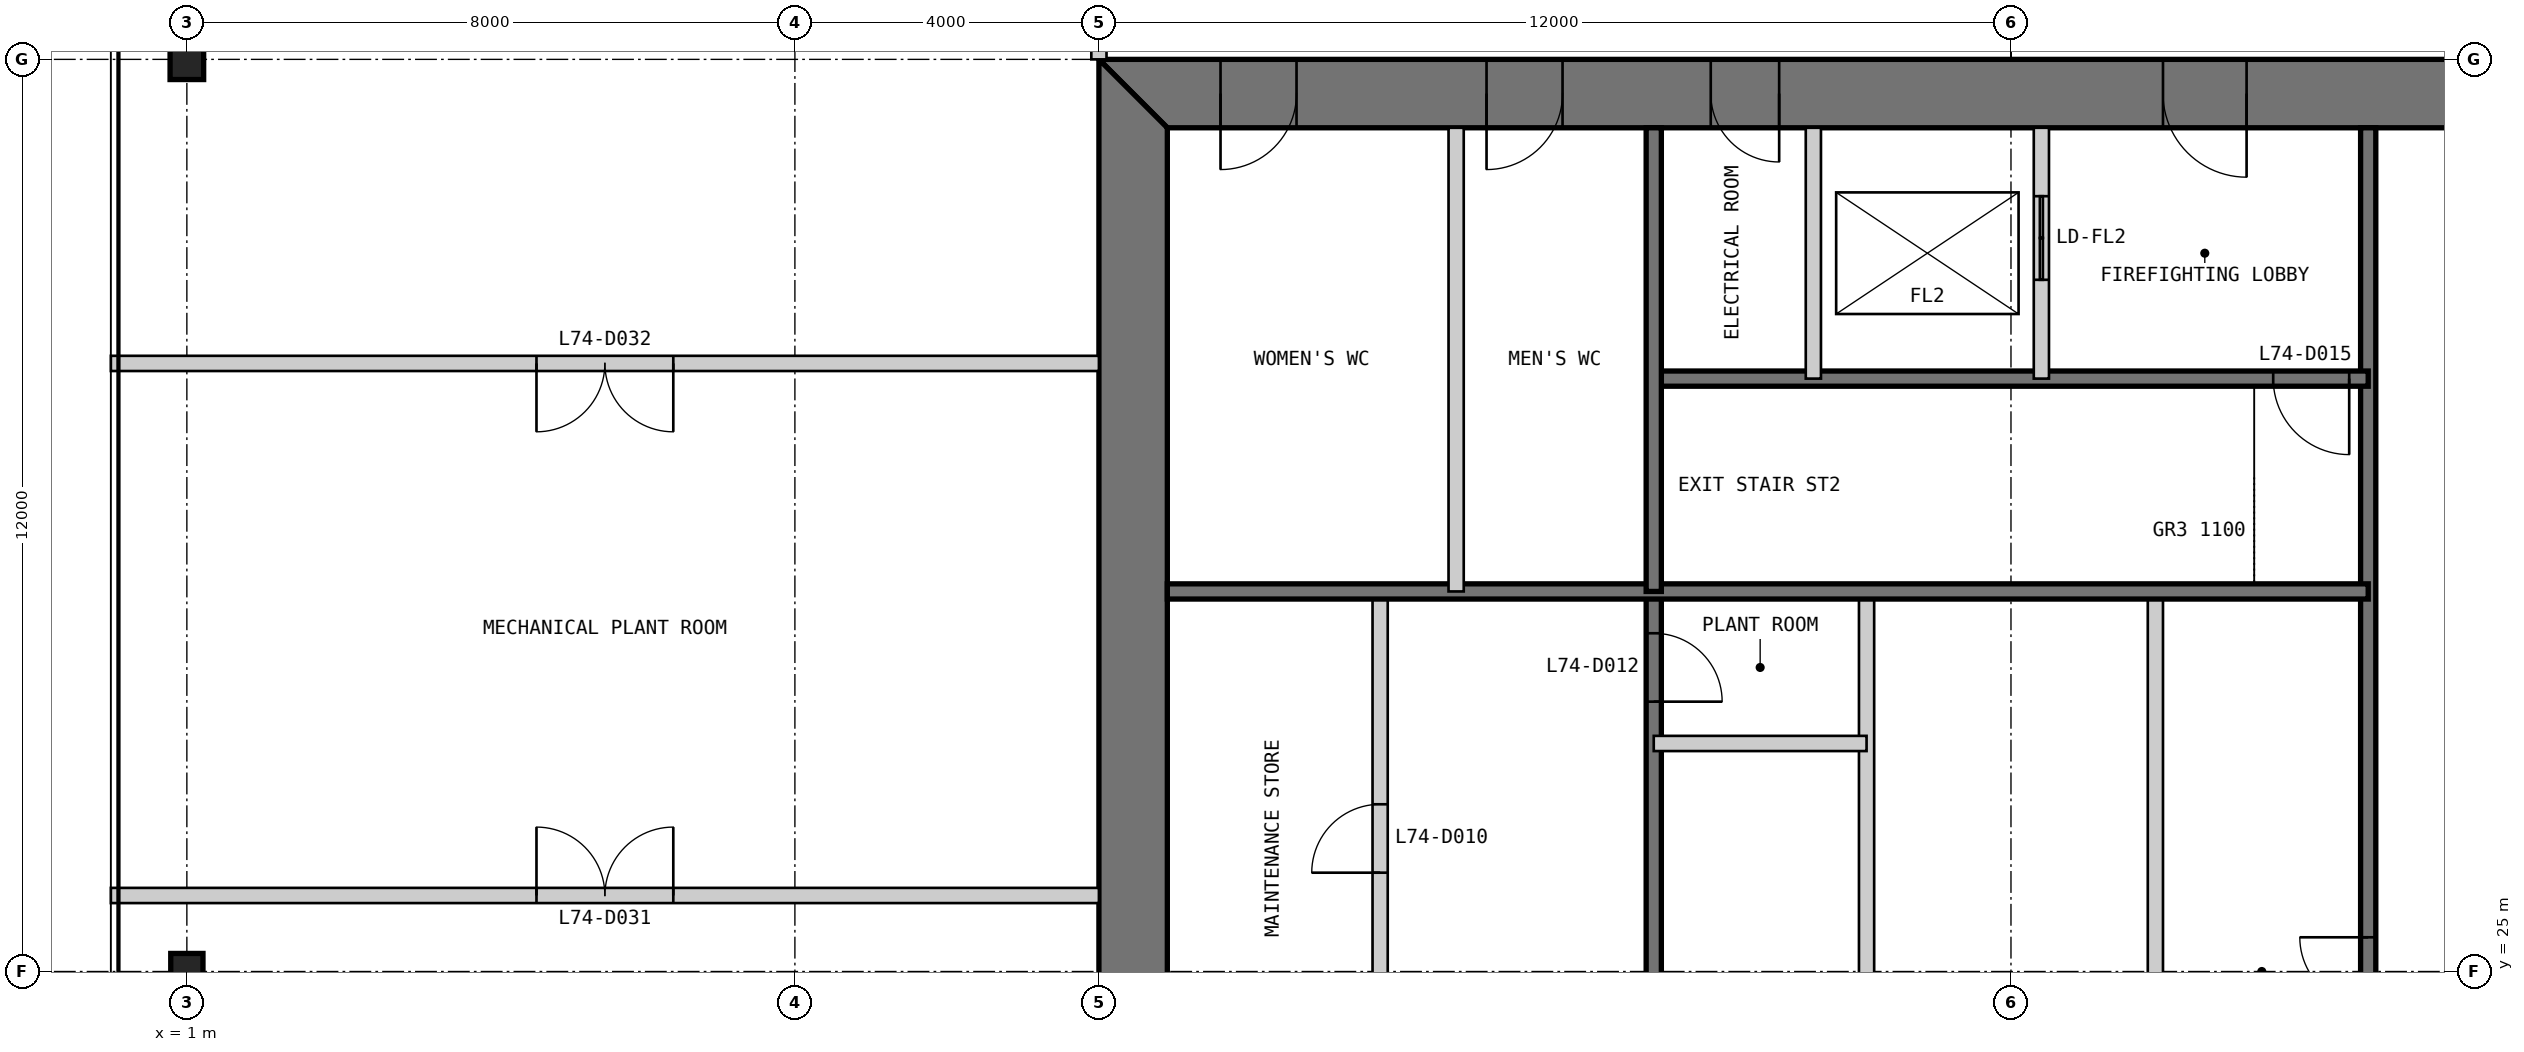
"""IFC4 building model, lengths in metres.
Left out: names, types, materials, properties, quantities, classifications, styles, units other than length and angle.
Written with IfcOpenShell. Run it as: python <this file> out.ifc"""

import sys

from ifc_helpers import new_model, si_unit, direction, frame, frame_2d, origin, origin_2d, place, context, subcontext, project, spatial, polyline, rectangle, i_section, outline, extrude, element, fill, save


model = new_model("IFC4")
c1 = context("Model", 3, precision=1e-05, world=origin(), true_north=direction((0.0, 1.0)))
c2 = subcontext(c1, "Body", "Model", "MODEL_VIEW")
j1 = project(units=[si_unit("LENGTHUNIT", "METRE"), si_unit("PLANEANGLEUNIT", "RADIAN")], contexts=[c1])
p1 = place(None, origin())
s1 = spatial("IfcSite", under=j1, at=p1, CompositionType="ELEMENT")
p2 = place(p1, origin())
s2 = spatial("IfcBuilding", under=s1, at=p2, CompositionType="ELEMENT")
p3 = place(p2, frame((0.0, 0.0, 307.8)))
s3 = spatial("IfcBuildingStorey", under=s2, at=p3, CompositionType="ELEMENT", Elevation=307.8)
p4 = place(p3, frame((1.0, 37.0, 0.0), z_axis=(0.0, 0.0, 1.0), x_axis=(1.0, 0.0, 0.0)))
e1 = element("IfcColumn", 1, at=p4, inside=s3, PredefinedType="COLUMN", context=c2, shape_type="SweptSolid", body=[
    extrude(i_section(OverallWidth=0.442, OverallDepth=0.531, WebThickness=0.066, FlangeThickness=0.106, at=origin_2d()), origin(), (0.0, 0.0, 1.0), 5.75),
])
p5 = place(p3, frame((1.0, 25.0, 0.0), z_axis=(0.0, 0.0, 1.0), x_axis=(1.0, 0.0, 0.0)))
e2 = element("IfcColumn", 2, at=p5, inside=s3, PredefinedType="COLUMN", context=c2, shape_type="SweptSolid", body=[
    extrude(i_section(OverallWidth=0.424, OverallDepth=0.475, WebThickness=0.048, FlangeThickness=0.077, at=origin_2d()), origin(), (0.0, 0.0, 1.0), 5.75),
])
p6 = place(p3, frame((37.0, 36.55, 0.0), z_axis=(0.0, 0.0, 1.0), x_axis=(-1.0, 0.0, 0.0)))
e3 = element("IfcWall", 3, at=p6, inside=s3, PredefinedType="SHEAR", context=c2, shape_type="SweptSolid", body=[
    extrude(outline(polyline([(0.0, -0.45), (24.0, -0.45), (23.1, 0.45), (0.9, 0.45), (0.0, -0.45)])), origin(), (0.0, 0.0, 1.0), 5.75),
])
p7 = place(p6, frame((4.9, 0.0, 0.0)))
e4 = element("IfcOpeningElement", 4, at=p7, cuts=e3, PredefinedType="OPENING", context=c2, shape_type="SweptSolid", body=[
    extrude(rectangle(XDim=1.0, YDim=2.2, at=frame_2d((0.5, 1.1))), frame((0.0, 0.46, 0.0), z_axis=(0.0, -1.0, 0.0), x_axis=(1.0, 0.0, 0.0)), (0.0, 0.0, 1.0), 0.92),
])
p8 = place(p6, frame((8.9, 0.0, 0.0)))
e5 = element("IfcOpeningElement", 5, at=p8, cuts=e3, PredefinedType="OPENING", context=c2, shape_type="SweptSolid", body=[
    extrude(rectangle(XDim=1.1, YDim=2.2, at=frame_2d((0.55, 1.1))), frame((0.0, 0.46, 0.0), z_axis=(0.0, -1.0, 0.0), x_axis=(1.0, 0.0, 0.0)), (0.0, 0.0, 1.0), 0.92),
])
p9 = place(p6, frame((15.05, 0.0, 0.0)))
e6 = element("IfcOpeningElement", 6, at=p9, cuts=e3, PredefinedType="OPENING", context=c2, shape_type="SweptSolid", body=[
    extrude(rectangle(XDim=0.9, YDim=2.2, at=frame_2d((0.45, 1.1))), frame((0.0, 0.46, 0.0), z_axis=(0.0, -1.0, 0.0), x_axis=(1.0, 0.0, 0.0)), (0.0, 0.0, 1.0), 0.92),
])
p10 = place(p6, frame((17.9, 0.0, 0.0)))
e7 = element("IfcOpeningElement", 7, at=p10, cuts=e3, PredefinedType="OPENING", context=c2, shape_type="SweptSolid", body=[
    extrude(rectangle(XDim=1.0, YDim=2.2, at=frame_2d((0.5, 1.1))), frame((0.0, 0.46, 0.0), z_axis=(0.0, -1.0, 0.0), x_axis=(1.0, 0.0, 0.0)), (0.0, 0.0, 1.0), 0.92),
])
p11 = place(p6, frame((21.4, 0.0, 0.0)))
e8 = element("IfcOpeningElement", 8, at=p11, cuts=e3, PredefinedType="OPENING", context=c2, shape_type="SweptSolid", body=[
    extrude(rectangle(XDim=1.0, YDim=2.2, at=frame_2d((0.5, 1.1))), frame((0.0, 0.46, 0.0), z_axis=(0.0, -1.0, 0.0), x_axis=(1.0, 0.0, 0.0)), (0.0, 0.0, 1.0), 0.92),
])
p12 = place(p3, frame((13.45, 36.1, 0.0), z_axis=(0.0, 0.0, 1.0), x_axis=(0.0, -1.0, 0.0)))
e9 = element("IfcWall", 9, at=p12, inside=s3, PredefinedType="SHEAR", context=c2, shape_type="SweptSolid", body=[
    extrude(outline(polyline([(-0.9, -0.45), (23.1, -0.45), (22.2, 0.45), (0.0, 0.45), (-0.9, -0.45)])), origin(), (0.0, 0.0, 1.0), 5.75),
])
p13 = place(p12, frame((20.2, 0.0, 0.0)))
e10 = element("IfcOpeningElement", 10, at=p13, cuts=e9, PredefinedType="OPENING", context=c2, shape_type="SweptSolid", body=[
    extrude(rectangle(XDim=1.0, YDim=2.2, at=frame_2d((0.5, 1.1))), frame((0.0, 0.46, 0.0), z_axis=(0.0, -1.0, 0.0), x_axis=(1.0, 0.0, 0.0)), (0.0, 0.0, 1.0), 0.92),
])
p14 = place(p12, frame((17.25, 0.0, 0.0)))
e11 = element("IfcOpeningElement", 11, at=p14, cuts=e9, PredefinedType="OPENING", context=c2, shape_type="SweptSolid", body=[
    extrude(rectangle(XDim=0.9, YDim=2.2, at=frame_2d((0.45, 1.1))), frame((0.0, 0.46, 0.0), z_axis=(0.0, -1.0, 0.0), x_axis=(1.0, 0.0, 0.0)), (0.0, 0.0, 1.0), 0.92),
])
p15 = place(p3, frame((16.7, 13.9, 0.0), z_axis=(0.0, 0.0, 1.0), x_axis=(0.0, 1.0, 0.0)))
e12 = element("IfcWall", 12, at=p15, inside=s3, PredefinedType="PARTITIONING", context=c2, shape_type="SweptSolid", body=[
    extrude(rectangle(XDim=16.1, YDim=0.2, at=frame_2d((8.05, 0.0))), origin(), (0.0, 0.0, 1.0), 5.75),
])
p16 = place(p15, frame((7.4, 0.0, 0.0)))
e13 = element("IfcOpeningElement", 13, at=p16, cuts=e12, PredefinedType="OPENING", context=c2, shape_type="SweptSolid", body=[
    extrude(rectangle(XDim=0.9, YDim=2.2, at=frame_2d((0.45, 1.1))), frame((0.0, 0.11, 0.0), z_axis=(0.0, -1.0, 0.0), x_axis=(1.0, 0.0, 0.0)), (0.0, 0.0, 1.0), 0.22),
])
p17 = place(p15, frame((12.4, 0.0, 0.0)))
e14 = element("IfcOpeningElement", 14, at=p17, cuts=e12, PredefinedType="OPENING", context=c2, shape_type="SweptSolid", body=[
    extrude(rectangle(XDim=0.9, YDim=2.2, at=frame_2d((0.45, 1.1))), frame((0.0, 0.11, 0.0), z_axis=(0.0, -1.0, 0.0), x_axis=(1.0, 0.0, 0.0)), (0.0, 0.0, 1.0), 0.22),
])
p18 = place(p3, frame((20.3, 13.9, 0.0), z_axis=(0.0, 0.0, 1.0), x_axis=(0.0, 1.0, 0.0)))
e15 = element("IfcWall", 15, at=p18, inside=s3, PredefinedType="SOLIDWALL", context=c2, shape_type="SweptSolid", body=[
    extrude(rectangle(XDim=16.1, YDim=0.2, at=frame_2d((8.05, 0.0))), origin(), (0.0, 0.0, 1.0), 5.75),
])
p19 = place(p18, frame((9.65, 0.0, 0.0)))
e16 = element("IfcOpeningElement", 16, at=p19, cuts=e15, PredefinedType="OPENING", context=c2, shape_type="SweptSolid", body=[
    extrude(rectangle(XDim=0.9, YDim=2.2, at=frame_2d((0.45, 1.1))), frame((0.0, 0.11, 0.0), z_axis=(0.0, -1.0, 0.0), x_axis=(1.0, 0.0, 0.0)), (0.0, 0.0, 1.0), 0.22),
])
p20 = place(p18, frame((14.65, 0.0, 0.0)))
e17 = element("IfcOpeningElement", 17, at=p20, cuts=e15, PredefinedType="OPENING", context=c2, shape_type="SweptSolid", body=[
    extrude(rectangle(XDim=0.9, YDim=2.2, at=frame_2d((0.45, 1.1))), frame((0.0, 0.11, 0.0), z_axis=(0.0, -1.0, 0.0), x_axis=(1.0, 0.0, 0.0)), (0.0, 0.0, 1.0), 0.22),
])
p21 = place(p3, frame((23.1, 20.0, 0.0), z_axis=(0.0, 0.0, 1.0), x_axis=(0.0, 1.0, 0.0)))
e18 = element("IfcWall", 18, at=p21, inside=s3, PredefinedType="PARTITIONING", context=c2, shape_type="SweptSolid", body=[
    extrude(rectangle(XDim=10.0, YDim=0.2, at=frame_2d((5.0, 0.0))), origin(), (0.0, 0.0, 1.0), 5.75),
])
p22 = place(p3, frame((20.3, 28.0, 0.0), z_axis=(0.0, 0.0, 1.0), x_axis=(1.0, 0.0, 0.0)))
e19 = element("IfcWall", 19, at=p22, inside=s3, PredefinedType="PARTITIONING", context=c2, shape_type="SweptSolid", body=[
    extrude(rectangle(XDim=2.8, YDim=0.2, at=frame_2d((1.4, 0.0))), origin(), (0.0, 0.0, 1.0), 5.75),
])
p23 = place(p3, frame((29.7, 36.1, 0.0), z_axis=(0.0, 0.0, 1.0), x_axis=(0.0, -1.0, 0.0)))
e20 = element("IfcWall", 20, at=p23, inside=s3, PredefinedType="SOLIDWALL", context=c2, shape_type="SweptSolid", body=[
    extrude(rectangle(XDim=16.1, YDim=0.2, at=frame_2d((8.05, 0.0))), origin(), (0.0, 0.0, 1.0), 5.75),
])
p24 = place(p23, frame((10.65, 0.0, 0.0)))
e21 = element("IfcOpeningElement", 21, at=p24, cuts=e20, PredefinedType="OPENING", context=c2, shape_type="SweptSolid", body=[
    extrude(rectangle(XDim=0.9, YDim=2.2, at=frame_2d((0.45, 1.1))), frame((0.0, 0.11, 0.0), z_axis=(0.0, -1.0, 0.0), x_axis=(1.0, 0.0, 0.0)), (0.0, 0.0, 1.0), 0.22),
])
p25 = place(p3, frame((26.9, 30.0, 0.0), z_axis=(0.0, 0.0, 1.0), x_axis=(0.0, -1.0, 0.0)))
e22 = element("IfcWall", 22, at=p25, inside=s3, PredefinedType="PARTITIONING", context=c2, shape_type="SweptSolid", body=[
    extrude(rectangle(XDim=10.0, YDim=0.2, at=frame_2d((5.0, 0.0))), origin(), (0.0, 0.0, 1.0), 5.75),
])
p26 = place(p3, frame((29.7, 32.8, 0.0), z_axis=(0.0, 0.0, 1.0), x_axis=(-1.0, 0.0, 0.0)))
e23 = element("IfcWall", 23, at=p26, inside=s3, PredefinedType="SOLIDWALL", context=c2, shape_type="SweptSolid", body=[
    extrude(rectangle(XDim=9.4, YDim=0.2, at=frame_2d((4.7, 0.0))), origin(), (0.0, 0.0, 1.0), 5.75),
])
p27 = place(p26, frame((0.25, 0.0, 0.0)))
e24 = element("IfcOpeningElement", 24, at=p27, cuts=e23, PredefinedType="OPENING", context=c2, shape_type="SweptSolid", body=[
    extrude(rectangle(XDim=1.0, YDim=2.2, at=frame_2d((0.5, 1.1))), frame((0.0, 0.11, 0.0), z_axis=(0.0, -1.0, 0.0), x_axis=(1.0, 0.0, 0.0)), (0.0, 0.0, 1.0), 0.22),
])
p28 = place(p3, frame((29.7, 30.0, 0.0), z_axis=(0.0, 0.0, 1.0), x_axis=(-1.0, 0.0, 0.0)))
e25 = element("IfcWall", 25, at=p28, inside=s3, PredefinedType="SOLIDWALL", context=c2, shape_type="SweptSolid", body=[
    extrude(rectangle(XDim=15.8, YDim=0.2, at=frame_2d((7.9, 0.0))), origin(), (0.0, 0.0, 1.0), 5.75),
])
p29 = place(p3, frame((25.4, 36.1, 0.0), z_axis=(0.0, 0.0, 1.0), x_axis=(0.0, -1.0, 0.0)))
e26 = element("IfcWall", 26, at=p29, inside=s3, PredefinedType="PARTITIONING", context=c2, shape_type="SweptSolid", body=[
    extrude(rectangle(XDim=3.3, YDim=0.2, at=frame_2d((1.65, 0.0))), origin(), (0.0, 0.0, 1.0), 5.75),
])
p30 = place(p29, frame((0.9, 0.0, 0.0)))
e27 = element("IfcOpeningElement", 27, at=p30, cuts=e26, PredefinedType="OPENING", context=c2, shape_type="SweptSolid", body=[
    extrude(rectangle(XDim=1.1, YDim=2.2, at=frame_2d((0.55, 1.1))), frame((0.0, 0.11, 0.0), z_axis=(0.0, -1.0, 0.0), x_axis=(1.0, 0.0, 0.0)), (0.0, 0.0, 1.0), 0.22),
])
p31 = place(p3, frame((22.4, 36.1, 0.0), z_axis=(0.0, 0.0, 1.0), x_axis=(0.0, -1.0, 0.0)))
e28 = element("IfcWall", 28, at=p31, inside=s3, PredefinedType="PARTITIONING", context=c2, shape_type="SweptSolid", body=[
    extrude(rectangle(XDim=3.3, YDim=0.2, at=frame_2d((1.65, 0.0))), origin(), (0.0, 0.0, 1.0), 5.75),
])
p32 = place(p3, frame((20.3, 36.1, 0.0), z_axis=(0.0, 0.0, 1.0), x_axis=(0.0, -1.0, 0.0)))
e29 = element("IfcWall", 29, at=p32, inside=s3, PredefinedType="SOLIDWALL", context=c2, shape_type="SweptSolid", body=[
    extrude(rectangle(XDim=6.1, YDim=0.2, at=frame_2d((3.05, 0.0))), origin(), (0.0, 0.0, 1.0), 5.75),
])
p33 = place(p3, frame((17.7, 36.1, 0.0), z_axis=(0.0, 0.0, 1.0), x_axis=(0.0, -1.0, 0.0)))
e30 = element("IfcWall", 30, at=p33, inside=s3, PredefinedType="PARTITIONING", context=c2, shape_type="SweptSolid", body=[
    extrude(rectangle(XDim=6.1, YDim=0.2, at=frame_2d((3.05, 0.0))), origin(), (0.0, 0.0, 1.0), 5.75),
])
p34 = place(p3, frame((13.0, 37.0, 0.0), z_axis=(0.0, 0.0, 1.0), x_axis=(0.0, 1.0, 0.0)))
e31 = element("IfcWall", 31, at=p34, inside=s3, PredefinedType="PARTITIONING", context=c2, shape_type="SweptSolid", body=[
    extrude(rectangle(XDim=2.4, YDim=0.2, at=frame_2d((1.2, 0.0))), origin(), (0.0, 0.0, 1.0), 4.802),
])
p35 = place(p3, frame((0.0, 26.0, 0.0), z_axis=(0.0, 0.0, 1.0), x_axis=(1.0, 0.0, 0.0)))
e32 = element("IfcWall", 32, at=p35, inside=s3, PredefinedType="PARTITIONING", context=c2, shape_type="SweptSolid", body=[
    extrude(rectangle(XDim=13.0, YDim=0.2, at=frame_2d((6.5, 0.0))), origin(), (0.0, 0.0, 1.0), 5.75),
])
p36 = place(p35, frame((5.6, 0.0, 0.0)))
e33 = element("IfcOpeningElement", 33, at=p36, cuts=e32, PredefinedType="OPENING", context=c2, shape_type="SweptSolid", body=[
    extrude(rectangle(XDim=1.8, YDim=2.4, at=frame_2d((0.9, 1.2))), frame((0.0, 0.11, 0.0), z_axis=(0.0, -1.0, 0.0), x_axis=(1.0, 0.0, 0.0)), (0.0, 0.0, 1.0), 0.22),
])
p37 = place(p3, frame((0.0, 33.0, 0.0), z_axis=(0.0, 0.0, 1.0), x_axis=(1.0, 0.0, 0.0)))
e34 = element("IfcWall", 34, at=p37, inside=s3, PredefinedType="PARTITIONING", context=c2, shape_type="SweptSolid", body=[
    extrude(rectangle(XDim=13.0, YDim=0.2, at=frame_2d((6.5, 0.0))), origin(), (0.0, 0.0, 1.0), 5.75),
])
p38 = place(p37, frame((5.6, 0.0, 0.0)))
e35 = element("IfcOpeningElement", 35, at=p38, cuts=e34, PredefinedType="OPENING", context=c2, shape_type="SweptSolid", body=[
    extrude(rectangle(XDim=1.8, YDim=2.4, at=frame_2d((0.9, 1.2))), frame((0.0, 0.11, 0.0), z_axis=(0.0, -1.0, 0.0), x_axis=(1.0, 0.0, 0.0)), (0.0, 0.0, 1.0), 0.22),
])
p39 = place(p17, origin())
e36 = element("IfcDoor", 36, at=p39, inside=s3, OperationType="SINGLE_SWING_LEFT", PredefinedType="DOOR", context=c2, shape_type="SweptSolid", body=[
    extrude(rectangle(XDim=0.9, YDim=2.2, at=frame_2d((0.45, 1.1))), frame((0.0, 0.025, 0.0), z_axis=(0.0, -1.0, 0.0), x_axis=(1.0, 0.0, 0.0)), (0.0, 0.0, 1.0), 0.05),
])
fill(e14, e36)
p40 = place(p20, frame((0.9, 0.0, 0.0), z_axis=(0.0, 0.0, 1.0), x_axis=(-1.0, 0.0, 0.0)))
e37 = element("IfcDoor", 37, at=p40, inside=s3, OperationType="SINGLE_SWING_RIGHT", PredefinedType="DOOR", context=c2, shape_type="SweptSolid", body=[
    extrude(rectangle(XDim=0.9, YDim=2.2, at=frame_2d((0.45, 1.1))), frame((0.0, 0.025, 0.0), z_axis=(0.0, -1.0, 0.0), x_axis=(1.0, 0.0, 0.0)), (0.0, 0.0, 1.0), 0.05),
])
fill(e17, e37)
p41 = place(p8, origin())
e38 = element("IfcDoor", 38, at=p41, inside=s3, OperationType="SINGLE_SWING_LEFT", PredefinedType="DOOR", context=c2, shape_type="SweptSolid", body=[
    extrude(rectangle(XDim=1.1, YDim=2.2, at=frame_2d((0.55, 1.1))), frame((0.0, 0.025, 0.0), z_axis=(0.0, -1.0, 0.0), x_axis=(1.0, 0.0, 0.0)), (0.0, 0.0, 1.0), 0.05),
    extrude(outline(polyline([(0.0, 0.0), (0.04, 0.0), (0.04, 2.16), (1.06, 2.16), (1.06, 0.0), (1.1, 0.0), (1.1, 2.2), (0.0, 2.2), (0.0, 0.0)])), frame((0.0, 0.3, 0.0), z_axis=(0.0, -1.0, 0.0), x_axis=(1.0, 0.0, 0.0)), (0.0, 0.0, 1.0), 0.6),
])
fill(e5, e38)
p42 = place(p27, origin())
e39 = element("IfcDoor", 39, at=p42, inside=s3, OperationType="SINGLE_SWING_LEFT", PredefinedType="DOOR", context=c2, shape_type="SweptSolid", body=[
    extrude(rectangle(XDim=1.0, YDim=2.2, at=frame_2d((0.5, 1.1))), frame((0.0, 0.025, 0.0), z_axis=(0.0, -1.0, 0.0), x_axis=(1.0, 0.0, 0.0)), (0.0, 0.0, 1.0), 0.05),
])
fill(e24, e39)
p43 = place(p9, origin())
e40 = element("IfcDoor", 40, at=p43, inside=s3, OperationType="SINGLE_SWING_LEFT", PredefinedType="DOOR", context=c2, shape_type="SweptSolid", body=[
    extrude(rectangle(XDim=0.9, YDim=2.2, at=frame_2d((0.45, 1.1))), frame((0.0, 0.025, 0.0), z_axis=(0.0, -1.0, 0.0), x_axis=(1.0, 0.0, 0.0)), (0.0, 0.0, 1.0), 0.05),
    extrude(outline(polyline([(0.0, 0.0), (0.04, 0.0), (0.04, 2.16), (0.86, 2.16), (0.86, 0.0), (0.9, 0.0), (0.9, 2.2), (0.0, 2.2), (0.0, 0.0)])), frame((0.0, 0.3, 0.0), z_axis=(0.0, -1.0, 0.0), x_axis=(1.0, 0.0, 0.0)), (0.0, 0.0, 1.0), 0.6),
])
fill(e6, e40)
p44 = place(p10, origin())
e41 = element("IfcDoor", 41, at=p44, inside=s3, OperationType="SINGLE_SWING_RIGHT", PredefinedType="DOOR", context=c2, shape_type="SweptSolid", body=[
    extrude(rectangle(XDim=1.0, YDim=2.2, at=frame_2d((0.5, 1.1))), frame((0.0, 0.025, 0.0), z_axis=(0.0, -1.0, 0.0), x_axis=(1.0, 0.0, 0.0)), (0.0, 0.0, 1.0), 0.05),
    extrude(outline(polyline([(0.0, 0.0), (0.04, 0.0), (0.04, 2.16), (0.96, 2.16), (0.96, 0.0), (1.0, 0.0), (1.0, 2.2), (0.0, 2.2), (0.0, 0.0)])), frame((0.0, 0.3, 0.0), z_axis=(0.0, -1.0, 0.0), x_axis=(1.0, 0.0, 0.0)), (0.0, 0.0, 1.0), 0.6),
])
fill(e7, e41)
p45 = place(p11, origin())
e42 = element("IfcDoor", 42, at=p45, inside=s3, OperationType="SINGLE_SWING_RIGHT", PredefinedType="DOOR", context=c2, shape_type="SweptSolid", body=[
    extrude(rectangle(XDim=1.0, YDim=2.2, at=frame_2d((0.5, 1.1))), frame((0.0, 0.025, 0.0), z_axis=(0.0, -1.0, 0.0), x_axis=(1.0, 0.0, 0.0)), (0.0, 0.0, 1.0), 0.05),
    extrude(outline(polyline([(0.0, 0.0), (0.04, 0.0), (0.04, 2.16), (0.96, 2.16), (0.96, 0.0), (1.0, 0.0), (1.0, 2.2), (0.0, 2.2), (0.0, 0.0)])), frame((0.0, 0.3, 0.0), z_axis=(0.0, -1.0, 0.0), x_axis=(1.0, 0.0, 0.0)), (0.0, 0.0, 1.0), 0.6),
])
fill(e8, e42)
p46 = place(p24, frame((0.9, 0.0, 0.0), z_axis=(0.0, 0.0, 1.0), x_axis=(-1.0, 0.0, 0.0)))
e43 = element("IfcDoor", 43, at=p46, inside=s3, OperationType="SINGLE_SWING_RIGHT", PredefinedType="DOOR", context=c2, shape_type="SweptSolid", body=[
    extrude(rectangle(XDim=0.9, YDim=2.2, at=frame_2d((0.45, 1.1))), frame((0.0, 0.025, 0.0), z_axis=(0.0, -1.0, 0.0), x_axis=(1.0, 0.0, 0.0)), (0.0, 0.0, 1.0), 0.05),
])
fill(e21, e43)
p47 = place(p36, origin())
e44 = element("IfcDoor", 44, at=p47, inside=s3, OperationType="DOUBLE_DOOR_SINGLE_SWING", PredefinedType="DOOR", context=c2, shape_type="SweptSolid", body=[
    extrude(rectangle(XDim=1.8, YDim=2.4, at=frame_2d((0.9, 1.2))), frame((0.0, 0.025, 0.0), z_axis=(0.0, -1.0, 0.0), x_axis=(1.0, 0.0, 0.0)), (0.0, 0.0, 1.0), 0.05),
])
fill(e33, e44)
p48 = place(p38, frame((1.8, 0.0, 0.0), z_axis=(0.0, 0.0, 1.0), x_axis=(-1.0, 0.0, 0.0)))
e45 = element("IfcDoor", 45, at=p48, inside=s3, OperationType="DOUBLE_DOOR_SINGLE_SWING", PredefinedType="DOOR", context=c2, shape_type="SweptSolid", body=[
    extrude(rectangle(XDim=1.8, YDim=2.4, at=frame_2d((0.9, 1.2))), frame((0.0, 0.025, 0.0), z_axis=(0.0, -1.0, 0.0), x_axis=(1.0, 0.0, 0.0)), (0.0, 0.0, 1.0), 0.05),
])
fill(e35, e45)
p49 = place(p30, origin())
e46 = element("IfcDoor", 46, at=p49, inside=s3, OperationType="DOUBLE_DOOR_SLIDING", PredefinedType="DOOR", context=c2, shape_type="SweptSolid", body=[
    extrude(rectangle(XDim=1.1, YDim=2.2, at=frame_2d((0.55, 1.1))), frame((0.0, 0.025, 0.0), z_axis=(0.0, -1.0, 0.0), x_axis=(1.0, 0.0, 0.0)), (0.0, 0.0, 1.0), 0.05),
])
fill(e27, e46)
save(model, sys.argv[1])
